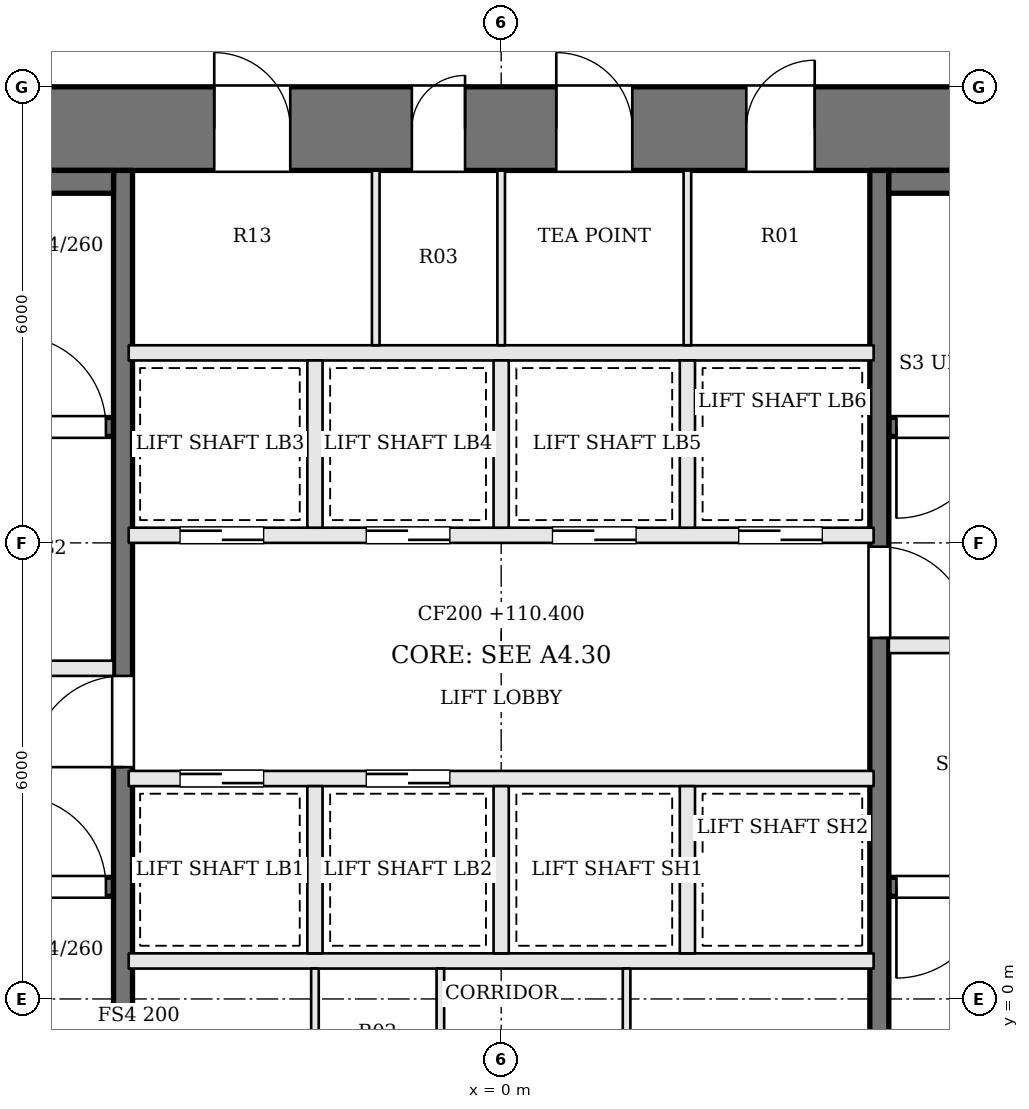
"""IFC4 building model, lengths in metres.
Left out: names, types, materials, properties, quantities, classifications, styles, units other than length and angle.
Written with IfcOpenShell. Run it as: python <this file> out.ifc"""

import sys

from ifc_helpers import new_model, si_unit, direction, frame, frame_2d, origin, place, context, subcontext, project, spatial, rectangle, extrude, element, fill, save


model = new_model("IFC4")
c1 = context("Model", 3, precision=1e-05, world=origin(), true_north=direction((0.0, 1.0)))
c2 = subcontext(c1, "Body", "Model", "MODEL_VIEW")
j1 = project(units=[si_unit("LENGTHUNIT", "METRE"), si_unit("PLANEANGLEUNIT", "RADIAN")], contexts=[c1])
p1 = place(None, origin())
s1 = spatial("IfcSite", under=j1, at=p1, CompositionType="ELEMENT")
p2 = place(p1, origin())
s2 = spatial("IfcBuilding", under=s1, at=p2, CompositionType="ELEMENT")
p3 = place(p2, frame((0.0, 0.0, 110.4)))
s3 = spatial("IfcBuildingStorey", under=s2, at=p3, CompositionType="ELEMENT", Elevation=110.4)
p4 = place(p3, frame((-13.0, 11.45, 0.0), z_axis=(0.0, 0.0, 1.0), x_axis=(1.0, 0.0, 0.0)))
e1 = element("IfcWall", 1, at=p4, inside=s3, PredefinedType="SHEAR", context=c2, shape_type="SweptSolid", body=[
    extrude(rectangle(XDim=26.0, YDim=1.1, at=frame_2d((13.0, 0.0))), origin(), (0.0, 0.0, 1.0), 3.6),
])
p5 = place(p4, frame((9.225, 0.0, 0.0)))
e2 = element("IfcOpeningElement", 2, at=p5, cuts=e1, PredefinedType="OPENING", context=c2, shape_type="SweptSolid", body=[
    extrude(rectangle(XDim=1.0, YDim=2.1, at=frame_2d((0.5, 1.05))), frame((0.0, 0.56, 0.0), z_axis=(0.0, -1.0, 0.0), x_axis=(1.0, 0.0, 0.0)), (0.0, 0.0, 1.0), 1.12),
])
p6 = place(p4, frame((11.825, 0.0, 0.0)))
e3 = element("IfcOpeningElement", 3, at=p6, cuts=e1, PredefinedType="OPENING", context=c2, shape_type="SweptSolid", body=[
    extrude(rectangle(XDim=0.7, YDim=2.1, at=frame_2d((0.35, 1.05))), frame((0.0, 0.56, 0.0), z_axis=(0.0, -1.0, 0.0), x_axis=(1.0, 0.0, 0.0)), (0.0, 0.0, 1.0), 1.12),
])
p7 = place(p4, frame((13.725, 0.0, 0.0)))
e4 = element("IfcOpeningElement", 4, at=p7, cuts=e1, PredefinedType="OPENING", context=c2, shape_type="SweptSolid", body=[
    extrude(rectangle(XDim=1.0, YDim=2.1, at=frame_2d((0.5, 1.05))), frame((0.0, 0.56, 0.0), z_axis=(0.0, -1.0, 0.0), x_axis=(1.0, 0.0, 0.0)), (0.0, 0.0, 1.0), 1.12),
])
p8 = place(p4, frame((16.225, 0.0, 0.0)))
e5 = element("IfcOpeningElement", 5, at=p8, cuts=e1, PredefinedType="OPENING", context=c2, shape_type="SweptSolid", body=[
    extrude(rectangle(XDim=0.9, YDim=2.1, at=frame_2d((0.45, 1.05))), frame((0.0, 0.56, 0.0), z_axis=(0.0, -1.0, 0.0), x_axis=(1.0, 0.0, 0.0)), (0.0, 0.0, 1.0), 1.12),
])
p9 = place(p3, frame((-11.9, 1.475, 0.0), z_axis=(0.0, 0.0, 1.0), x_axis=(1.0, 0.0, 0.0)))
e6 = element("IfcWall", 6, at=p9, inside=s3, PredefinedType="SOLIDWALL", context=c2, shape_type="SweptSolid", body=[
    extrude(rectangle(XDim=6.8, YDim=0.25, at=frame_2d((3.4, 0.0))), origin(), (0.0, 0.0, 1.0), 3.4),
])
p10 = place(p9, frame((5.5, 0.0, 0.0)))
e7 = element("IfcOpeningElement", 7, at=p10, cuts=e6, PredefinedType="OPENING", context=c2, shape_type="SweptSolid", body=[
    extrude(rectangle(XDim=1.2, YDim=2.1, at=frame_2d((0.6, 1.05))), frame((0.0, 0.135, 0.0), z_axis=(0.0, -1.0, 0.0), x_axis=(1.0, 0.0, 0.0)), (0.0, 0.0, 1.0), 0.27),
])
p11 = place(p3, frame((11.9, 7.525, 0.0), z_axis=(0.0, 0.0, 1.0), x_axis=(-1.0, 0.0, 0.0)))
e8 = element("IfcWall", 8, at=p11, inside=s3, PredefinedType="SOLIDWALL", context=c2, shape_type="SweptSolid", body=[
    extrude(rectangle(XDim=6.8, YDim=0.25, at=frame_2d((3.4, 0.0))), origin(), (0.0, 0.0, 1.0), 3.4),
])
p12 = place(p11, frame((5.5, 0.0, 0.0)))
e9 = element("IfcOpeningElement", 9, at=p12, cuts=e8, PredefinedType="OPENING", context=c2, shape_type="SweptSolid", body=[
    extrude(rectangle(XDim=1.2, YDim=2.1, at=frame_2d((0.6, 1.05))), frame((0.0, 0.135, 0.0), z_axis=(0.0, -1.0, 0.0), x_axis=(1.0, 0.0, 0.0)), (0.0, 0.0, 1.0), 0.27),
])
p13 = place(p3, frame((-11.9, 4.35, 0.0), z_axis=(0.0, 0.0, 1.0), x_axis=(1.0, 0.0, 0.0)))
e10 = element("IfcWall", 10, at=p13, inside=s3, PredefinedType="SOLIDWALL", context=c2, shape_type="SweptSolid", body=[
    extrude(rectangle(XDim=6.8, YDim=0.2, at=frame_2d((3.4, 0.0))), origin(), (0.0, 0.0, 1.0), 3.4),
])
p14 = place(p13, frame((4.1, 0.0, 0.0)))
e11 = element("IfcOpeningElement", 11, at=p14, cuts=e10, PredefinedType="OPENING", context=c2, shape_type="SweptSolid", body=[
    extrude(rectangle(XDim=1.2, YDim=2.1, at=frame_2d((0.6, 1.05))), frame((0.0, 0.11, 0.0), z_axis=(0.0, -1.0, 0.0), x_axis=(1.0, 0.0, 0.0)), (0.0, 0.0, 1.0), 0.22),
])
p15 = place(p13, frame((0.8, 0.0, 0.0)))
e12 = element("IfcOpeningElement", 12, at=p15, cuts=e10, PredefinedType="OPENING", context=c2, shape_type="SweptSolid", body=[
    extrude(rectangle(XDim=1.2, YDim=2.1, at=frame_2d((0.6, 1.05))), frame((0.0, 0.11, 0.0), z_axis=(0.0, -1.0, 0.0), x_axis=(1.0, 0.0, 0.0)), (0.0, 0.0, 1.0), 0.22),
])
p16 = place(p3, frame((11.9, 4.65, 0.0), z_axis=(0.0, 0.0, 1.0), x_axis=(-1.0, 0.0, 0.0)))
e13 = element("IfcWall", 13, at=p16, inside=s3, PredefinedType="SOLIDWALL", context=c2, shape_type="SweptSolid", body=[
    extrude(rectangle(XDim=6.8, YDim=0.2, at=frame_2d((3.4, 0.0))), origin(), (0.0, 0.0, 1.0), 3.4),
])
p17 = place(p16, frame((4.1, 0.0, 0.0)))
e14 = element("IfcOpeningElement", 14, at=p17, cuts=e13, PredefinedType="OPENING", context=c2, shape_type="SweptSolid", body=[
    extrude(rectangle(XDim=1.2, YDim=2.1, at=frame_2d((0.6, 1.05))), frame((0.0, 0.11, 0.0), z_axis=(0.0, -1.0, 0.0), x_axis=(1.0, 0.0, 0.0)), (0.0, 0.0, 1.0), 0.22),
])
p18 = place(p16, frame((0.8, 0.0, 0.0)))
e15 = element("IfcOpeningElement", 15, at=p18, cuts=e13, PredefinedType="OPENING", context=c2, shape_type="SweptSolid", body=[
    extrude(rectangle(XDim=1.2, YDim=2.1, at=frame_2d((0.6, 1.05))), frame((0.0, 0.11, 0.0), z_axis=(0.0, -1.0, 0.0), x_axis=(1.0, 0.0, 0.0)), (0.0, 0.0, 1.0), 0.22),
])
p19 = place(p3, frame((-11.9, 7.525, 0.0), z_axis=(0.0, 0.0, 1.0), x_axis=(1.0, 0.0, 0.0)))
e16 = element("IfcWall", 16, at=p19, inside=s3, PredefinedType="SOLIDWALL", context=c2, shape_type="SweptSolid", body=[
    extrude(rectangle(XDim=6.8, YDim=0.25, at=frame_2d((3.4, 0.0))), origin(), (0.0, 0.0, 1.0), 3.4),
])
p20 = place(p19, frame((5.5, 0.0, 0.0)))
e17 = element("IfcOpeningElement", 17, at=p20, cuts=e16, PredefinedType="OPENING", context=c2, shape_type="SweptSolid", body=[
    extrude(rectangle(XDim=1.2, YDim=2.1, at=frame_2d((0.6, 1.05))), frame((0.0, 0.135, 0.0), z_axis=(0.0, -1.0, 0.0), x_axis=(1.0, 0.0, 0.0)), (0.0, 0.0, 1.0), 0.27),
])
p21 = place(p3, frame((11.9, 1.475, 0.0), z_axis=(0.0, 0.0, 1.0), x_axis=(-1.0, 0.0, 0.0)))
e18 = element("IfcWall", 18, at=p21, inside=s3, PredefinedType="SOLIDWALL", context=c2, shape_type="SweptSolid", body=[
    extrude(rectangle(XDim=6.8, YDim=0.25, at=frame_2d((3.4, 0.0))), origin(), (0.0, 0.0, 1.0), 3.4),
])
p22 = place(p21, frame((5.5, 0.0, 0.0)))
e19 = element("IfcOpeningElement", 19, at=p22, cuts=e18, PredefinedType="OPENING", context=c2, shape_type="SweptSolid", body=[
    extrude(rectangle(XDim=1.2, YDim=2.1, at=frame_2d((0.6, 1.05))), frame((0.0, 0.135, 0.0), z_axis=(0.0, -1.0, 0.0), x_axis=(1.0, 0.0, 0.0)), (0.0, 0.0, 1.0), 0.27),
])
p23 = place(p3, frame((-4.975, -1.9, 0.0), z_axis=(0.0, 0.0, 1.0), x_axis=(0.0, 1.0, 0.0)))
e20 = element("IfcWall", 20, at=p23, inside=s3, PredefinedType="SOLIDWALL", context=c2, shape_type="SweptSolid", body=[
    extrude(rectangle(XDim=12.8, YDim=0.25, at=frame_2d((6.4, 0.0))), origin(), (0.0, 0.0, 1.0), 3.4),
])
p24 = place(p23, frame((4.95, 0.0, 0.0)))
e21 = element("IfcOpeningElement", 21, at=p24, cuts=e20, PredefinedType="OPENING", context=c2, shape_type="SweptSolid", body=[
    extrude(rectangle(XDim=1.2, YDim=2.1, at=frame_2d((0.6, 1.05))), frame((0.0, 0.135, 0.0), z_axis=(0.0, -1.0, 0.0), x_axis=(1.0, 0.0, 0.0)), (0.0, 0.0, 1.0), 0.27),
])
p25 = place(p3, frame((4.975, 10.9, 0.0), z_axis=(0.0, 0.0, 1.0), x_axis=(0.0, -1.0, 0.0)))
e22 = element("IfcWall", 22, at=p25, inside=s3, PredefinedType="SOLIDWALL", context=c2, shape_type="SweptSolid", body=[
    extrude(rectangle(XDim=12.8, YDim=0.25, at=frame_2d((6.4, 0.0))), origin(), (0.0, 0.0, 1.0), 3.4),
])
p26 = place(p25, frame((4.95, 0.0, 0.0)))
e23 = element("IfcOpeningElement", 23, at=p26, cuts=e22, PredefinedType="OPENING", context=c2, shape_type="SweptSolid", body=[
    extrude(rectangle(XDim=1.2, YDim=2.1, at=frame_2d((0.6, 1.05))), frame((0.0, 0.135, 0.0), z_axis=(0.0, -1.0, 0.0), x_axis=(1.0, 0.0, 0.0)), (0.0, 0.0, 1.0), 0.27),
])
for number, where, z_axis, x_axis in (
    (24, (-11.9, 10.75, 0.0), (0.0, 0.0, 1.0), (1.0, 0.0, 0.0)),
    (25, (11.9, 10.75, 0.0), (0.0, 0.0, 1.0), (-1.0, 0.0, 0.0)),
):
    element("IfcWall", number, at=place(p3, frame(where, z_axis=z_axis, x_axis=x_axis)), inside=s3, PredefinedType="SOLIDWALL", context=c2, shape_type="SweptSolid", body=[
        extrude(rectangle(XDim=6.8, YDim=0.3, at=frame_2d((3.4, 0.0))), origin(), (0.0, 0.0, 1.0), 3.4),
    ])
p27 = place(p3, frame((-4.9, 0.5, 0.0), z_axis=(0.0, 0.0, 1.0), x_axis=(1.0, 0.0, 0.0)))
e26 = element("IfcWall", 26, at=p27, inside=s3, PredefinedType="SOLIDWALL", context=c2, shape_type="SweptSolid", body=[
    extrude(rectangle(XDim=9.8, YDim=0.2, at=frame_2d((4.9, 0.0))), origin(), (0.0, 0.0, 1.0), 3.4),
])
p28 = place(p3, frame((-4.9, 2.9, 0.0), z_axis=(0.0, 0.0, 1.0), x_axis=(1.0, 0.0, 0.0)))
e27 = element("IfcWall", 27, at=p28, inside=s3, PredefinedType="SOLIDWALL", context=c2, shape_type="SweptSolid", body=[
    extrude(rectangle(XDim=9.8, YDim=0.2, at=frame_2d((4.9, 0.0))), origin(), (0.0, 0.0, 1.0), 3.4),
])
p29 = place(p28, frame((0.675, 0.0, 0.0)))
e28 = element("IfcOpeningElement", 28, at=p29, cuts=e27, PredefinedType="OPENING", context=c2, shape_type="SweptSolid", body=[
    extrude(rectangle(XDim=1.1, YDim=2.1, at=frame_2d((0.55, 1.05))), frame((0.0, 0.11, 0.0), z_axis=(0.0, -1.0, 0.0), x_axis=(1.0, 0.0, 0.0)), (0.0, 0.0, 1.0), 0.22),
])
p30 = place(p28, frame((3.125, 0.0, 0.0)))
e29 = element("IfcOpeningElement", 29, at=p30, cuts=e27, PredefinedType="OPENING", context=c2, shape_type="SweptSolid", body=[
    extrude(rectangle(XDim=1.1, YDim=2.1, at=frame_2d((0.55, 1.05))), frame((0.0, 0.11, 0.0), z_axis=(0.0, -1.0, 0.0), x_axis=(1.0, 0.0, 0.0)), (0.0, 0.0, 1.0), 0.22),
])
p31 = place(p3, frame((-4.9, 6.1, 0.0), z_axis=(0.0, 0.0, 1.0), x_axis=(1.0, 0.0, 0.0)))
e30 = element("IfcWall", 30, at=p31, inside=s3, PredefinedType="SOLIDWALL", context=c2, shape_type="SweptSolid", body=[
    extrude(rectangle(XDim=9.8, YDim=0.2, at=frame_2d((4.9, 0.0))), origin(), (0.0, 0.0, 1.0), 3.4),
])
p32 = place(p31, frame((0.675, 0.0, 0.0)))
e31 = element("IfcOpeningElement", 31, at=p32, cuts=e30, PredefinedType="OPENING", context=c2, shape_type="SweptSolid", body=[
    extrude(rectangle(XDim=1.1, YDim=2.1, at=frame_2d((0.55, 1.05))), frame((0.0, 0.11, 0.0), z_axis=(0.0, -1.0, 0.0), x_axis=(1.0, 0.0, 0.0)), (0.0, 0.0, 1.0), 0.22),
])
p33 = place(p31, frame((3.125, 0.0, 0.0)))
e32 = element("IfcOpeningElement", 32, at=p33, cuts=e30, PredefinedType="OPENING", context=c2, shape_type="SweptSolid", body=[
    extrude(rectangle(XDim=1.1, YDim=2.1, at=frame_2d((0.55, 1.05))), frame((0.0, 0.11, 0.0), z_axis=(0.0, -1.0, 0.0), x_axis=(1.0, 0.0, 0.0)), (0.0, 0.0, 1.0), 0.22),
])
p34 = place(p31, frame((5.575, 0.0, 0.0)))
e33 = element("IfcOpeningElement", 33, at=p34, cuts=e30, PredefinedType="OPENING", context=c2, shape_type="SweptSolid", body=[
    extrude(rectangle(XDim=1.1, YDim=2.1, at=frame_2d((0.55, 1.05))), frame((0.0, 0.11, 0.0), z_axis=(0.0, -1.0, 0.0), x_axis=(1.0, 0.0, 0.0)), (0.0, 0.0, 1.0), 0.22),
])
p35 = place(p31, frame((8.025, 0.0, 0.0)))
e34 = element("IfcOpeningElement", 34, at=p35, cuts=e30, PredefinedType="OPENING", context=c2, shape_type="SweptSolid", body=[
    extrude(rectangle(XDim=1.1, YDim=2.1, at=frame_2d((0.55, 1.05))), frame((0.0, 0.11, 0.0), z_axis=(0.0, -1.0, 0.0), x_axis=(1.0, 0.0, 0.0)), (0.0, 0.0, 1.0), 0.22),
])
p36 = place(p3, frame((-4.9, 8.5, 0.0), z_axis=(0.0, 0.0, 1.0), x_axis=(1.0, 0.0, 0.0)))
e35 = element("IfcWall", 35, at=p36, inside=s3, PredefinedType="SOLIDWALL", context=c2, shape_type="SweptSolid", body=[
    extrude(rectangle(XDim=9.8, YDim=0.2, at=frame_2d((4.9, 0.0))), origin(), (0.0, 0.0, 1.0), 3.4),
])
for number, where, z_axis, x_axis in (
    (36, (-2.45, 0.6, 0.0), (0.0, 0.0, 1.0), (0.0, 1.0, 0.0)),
    (37, (0.0, 0.6, 0.0), (0.0, 0.0, 1.0), (0.0, 1.0, 0.0)),
    (38, (2.45, 0.6, 0.0), (0.0, 0.0, 1.0), (0.0, 1.0, 0.0)),
    (39, (-2.45, 6.2, 0.0), (0.0, 0.0, 1.0), (0.0, 1.0, 0.0)),
    (40, (0.0, 6.2, 0.0), (0.0, 0.0, 1.0), (0.0, 1.0, 0.0)),
    (41, (2.45, 6.2, 0.0), (0.0, 0.0, 1.0), (0.0, 1.0, 0.0)),
):
    element("IfcWall", number, at=place(p3, frame(where, z_axis=z_axis, x_axis=x_axis)), inside=s3, PredefinedType="SOLIDWALL", context=c2, shape_type="SweptSolid", body=[
        extrude(rectangle(XDim=2.2, YDim=0.2, at=frame_2d((1.1, 0.0))), origin(), (0.0, 0.0, 1.0), 3.4),
    ])
for number, where, z_axis, x_axis in (
    (42, (-2.45, -1.9, 0.0), (0.0, 0.0, 1.0), (0.0, 1.0, 0.0)),
    (43, (-0.8, -1.9, 0.0), (0.0, 0.0, 1.0), (0.0, 1.0, 0.0)),
    (44, (1.65, -1.9, 0.0), (0.0, 0.0, 1.0), (0.0, 1.0, 0.0)),
    (45, (-1.65, 8.6, 0.0), (0.0, 0.0, 1.0), (0.0, 1.0, 0.0)),
    (46, (0.0, 8.6, 0.0), (0.0, 0.0, 1.0), (0.0, 1.0, 0.0)),
    (47, (2.45, 8.6, 0.0), (0.0, 0.0, 1.0), (0.0, 1.0, 0.0)),
):
    element("IfcWall", number, at=place(p3, frame(where, z_axis=z_axis, x_axis=x_axis)), inside=s3, PredefinedType="PARTITIONING", context=c2, shape_type="SweptSolid", body=[
        extrude(rectangle(XDim=2.3, YDim=0.1, at=frame_2d((1.15, 0.0))), origin(), (0.0, 0.0, 1.0), 3.4),
    ])
p37 = place(p24, origin())
e48 = element("IfcDoor", 48, at=p37, inside=s3, OperationType="SINGLE_SWING_LEFT", PredefinedType="DOOR", context=c2, shape_type="SweptSolid", body=[
    extrude(rectangle(XDim=1.2, YDim=2.1, at=frame_2d((0.6, 1.05))), frame((0.0, 0.025, 0.0), z_axis=(0.0, -1.0, 0.0), x_axis=(1.0, 0.0, 0.0)), (0.0, 0.0, 1.0), 0.05),
])
fill(e21, e48)
p38 = place(p26, origin())
e49 = element("IfcDoor", 49, at=p38, inside=s3, OperationType="SINGLE_SWING_RIGHT", PredefinedType="DOOR", context=c2, shape_type="SweptSolid", body=[
    extrude(rectangle(XDim=1.2, YDim=2.1, at=frame_2d((0.6, 1.05))), frame((0.0, 0.025, 0.0), z_axis=(0.0, -1.0, 0.0), x_axis=(1.0, 0.0, 0.0)), (0.0, 0.0, 1.0), 0.05),
])
fill(e23, e49)
p39 = place(p10, origin())
e50 = element("IfcDoor", 50, at=p39, inside=s3, OperationType="SINGLE_SWING_LEFT", PredefinedType="DOOR", context=c2, shape_type="SweptSolid", body=[
    extrude(rectangle(XDim=1.2, YDim=2.1, at=frame_2d((0.6, 1.05))), frame((0.0, 0.025, 0.0), z_axis=(0.0, -1.0, 0.0), x_axis=(1.0, 0.0, 0.0)), (0.0, 0.0, 1.0), 0.05),
])
fill(e7, e50)
p40 = place(p12, origin())
e51 = element("IfcDoor", 51, at=p40, inside=s3, OperationType="SINGLE_SWING_RIGHT", PredefinedType="DOOR", context=c2, shape_type="SweptSolid", body=[
    extrude(rectangle(XDim=1.2, YDim=2.1, at=frame_2d((0.6, 1.05))), frame((0.0, 0.025, 0.0), z_axis=(0.0, -1.0, 0.0), x_axis=(1.0, 0.0, 0.0)), (0.0, 0.0, 1.0), 0.05),
])
fill(e9, e51)
p41 = place(p20, origin())
e52 = element("IfcDoor", 52, at=p41, inside=s3, OperationType="SINGLE_SWING_LEFT", PredefinedType="DOOR", context=c2, shape_type="SweptSolid", body=[
    extrude(rectangle(XDim=1.2, YDim=2.1, at=frame_2d((0.6, 1.05))), frame((0.0, 0.025, 0.0), z_axis=(0.0, -1.0, 0.0), x_axis=(1.0, 0.0, 0.0)), (0.0, 0.0, 1.0), 0.05),
])
fill(e17, e52)
p42 = place(p22, origin())
e53 = element("IfcDoor", 53, at=p42, inside=s3, OperationType="SINGLE_SWING_RIGHT", PredefinedType="DOOR", context=c2, shape_type="SweptSolid", body=[
    extrude(rectangle(XDim=1.2, YDim=2.1, at=frame_2d((0.6, 1.05))), frame((0.0, 0.025, 0.0), z_axis=(0.0, -1.0, 0.0), x_axis=(1.0, 0.0, 0.0)), (0.0, 0.0, 1.0), 0.05),
])
fill(e19, e53)
p43 = place(p29, origin())
e54 = element("IfcDoor", 54, at=p43, inside=s3, OperationType="SLIDING_TO_RIGHT", PredefinedType="DOOR", context=c2, shape_type="SweptSolid", body=[
    extrude(rectangle(XDim=1.1, YDim=2.1, at=frame_2d((0.55, 1.05))), frame((0.0, 0.025, 0.0), z_axis=(0.0, -1.0, 0.0), x_axis=(1.0, 0.0, 0.0)), (0.0, 0.0, 1.0), 0.05),
])
fill(e28, e54)
p44 = place(p30, origin())
e55 = element("IfcDoor", 55, at=p44, inside=s3, OperationType="SLIDING_TO_LEFT", PredefinedType="DOOR", context=c2, shape_type="SweptSolid", body=[
    extrude(rectangle(XDim=1.1, YDim=2.1, at=frame_2d((0.55, 1.05))), frame((0.0, 0.025, 0.0), z_axis=(0.0, -1.0, 0.0), x_axis=(1.0, 0.0, 0.0)), (0.0, 0.0, 1.0), 0.05),
])
fill(e29, e55)
p45 = place(p32, origin())
e56 = element("IfcDoor", 56, at=p45, inside=s3, OperationType="SLIDING_TO_RIGHT", PredefinedType="DOOR", context=c2, shape_type="SweptSolid", body=[
    extrude(rectangle(XDim=1.1, YDim=2.1, at=frame_2d((0.55, 1.05))), frame((0.0, 0.025, 0.0), z_axis=(0.0, -1.0, 0.0), x_axis=(1.0, 0.0, 0.0)), (0.0, 0.0, 1.0), 0.05),
])
fill(e31, e56)
p46 = place(p33, origin())
e57 = element("IfcDoor", 57, at=p46, inside=s3, OperationType="SLIDING_TO_LEFT", PredefinedType="DOOR", context=c2, shape_type="SweptSolid", body=[
    extrude(rectangle(XDim=1.1, YDim=2.1, at=frame_2d((0.55, 1.05))), frame((0.0, 0.025, 0.0), z_axis=(0.0, -1.0, 0.0), x_axis=(1.0, 0.0, 0.0)), (0.0, 0.0, 1.0), 0.05),
])
fill(e32, e57)
p47 = place(p34, origin())
e58 = element("IfcDoor", 58, at=p47, inside=s3, OperationType="SLIDING_TO_RIGHT", PredefinedType="DOOR", context=c2, shape_type="SweptSolid", body=[
    extrude(rectangle(XDim=1.1, YDim=2.1, at=frame_2d((0.55, 1.05))), frame((0.0, 0.025, 0.0), z_axis=(0.0, -1.0, 0.0), x_axis=(1.0, 0.0, 0.0)), (0.0, 0.0, 1.0), 0.05),
])
fill(e33, e58)
p48 = place(p35, origin())
e59 = element("IfcDoor", 59, at=p48, inside=s3, OperationType="SLIDING_TO_LEFT", PredefinedType="DOOR", context=c2, shape_type="SweptSolid", body=[
    extrude(rectangle(XDim=1.1, YDim=2.1, at=frame_2d((0.55, 1.05))), frame((0.0, 0.025, 0.0), z_axis=(0.0, -1.0, 0.0), x_axis=(1.0, 0.0, 0.0)), (0.0, 0.0, 1.0), 0.05),
])
fill(e34, e59)
p49 = place(p5, origin())
e60 = element("IfcDoor", 60, at=p49, inside=s3, OperationType="SINGLE_SWING_LEFT", PredefinedType="DOOR", context=c2, shape_type="SweptSolid", body=[
    extrude(rectangle(XDim=1.0, YDim=2.1, at=frame_2d((0.5, 1.05))), frame((0.0, 0.025, 0.0), z_axis=(0.0, -1.0, 0.0), x_axis=(1.0, 0.0, 0.0)), (0.0, 0.0, 1.0), 0.05),
])
fill(e2, e60)
p50 = place(p6, origin())
e61 = element("IfcDoor", 61, at=p50, inside=s3, OperationType="SINGLE_SWING_RIGHT", PredefinedType="DOOR", context=c2, shape_type="SweptSolid", body=[
    extrude(rectangle(XDim=0.7, YDim=2.1, at=frame_2d((0.35, 1.05))), frame((0.0, 0.025, 0.0), z_axis=(0.0, -1.0, 0.0), x_axis=(1.0, 0.0, 0.0)), (0.0, 0.0, 1.0), 0.05),
])
fill(e3, e61)
p51 = place(p7, origin())
e62 = element("IfcDoor", 62, at=p51, inside=s3, OperationType="SINGLE_SWING_LEFT", PredefinedType="DOOR", context=c2, shape_type="SweptSolid", body=[
    extrude(rectangle(XDim=1.0, YDim=2.1, at=frame_2d((0.5, 1.05))), frame((0.0, 0.025, 0.0), z_axis=(0.0, -1.0, 0.0), x_axis=(1.0, 0.0, 0.0)), (0.0, 0.0, 1.0), 0.05),
])
fill(e4, e62)
p52 = place(p8, origin())
e63 = element("IfcDoor", 63, at=p52, inside=s3, OperationType="SINGLE_SWING_RIGHT", PredefinedType="DOOR", context=c2, shape_type="SweptSolid", body=[
    extrude(rectangle(XDim=0.9, YDim=2.1, at=frame_2d((0.45, 1.05))), frame((0.0, 0.025, 0.0), z_axis=(0.0, -1.0, 0.0), x_axis=(1.0, 0.0, 0.0)), (0.0, 0.0, 1.0), 0.05),
])
fill(e5, e63)
save(model, sys.argv[1])
